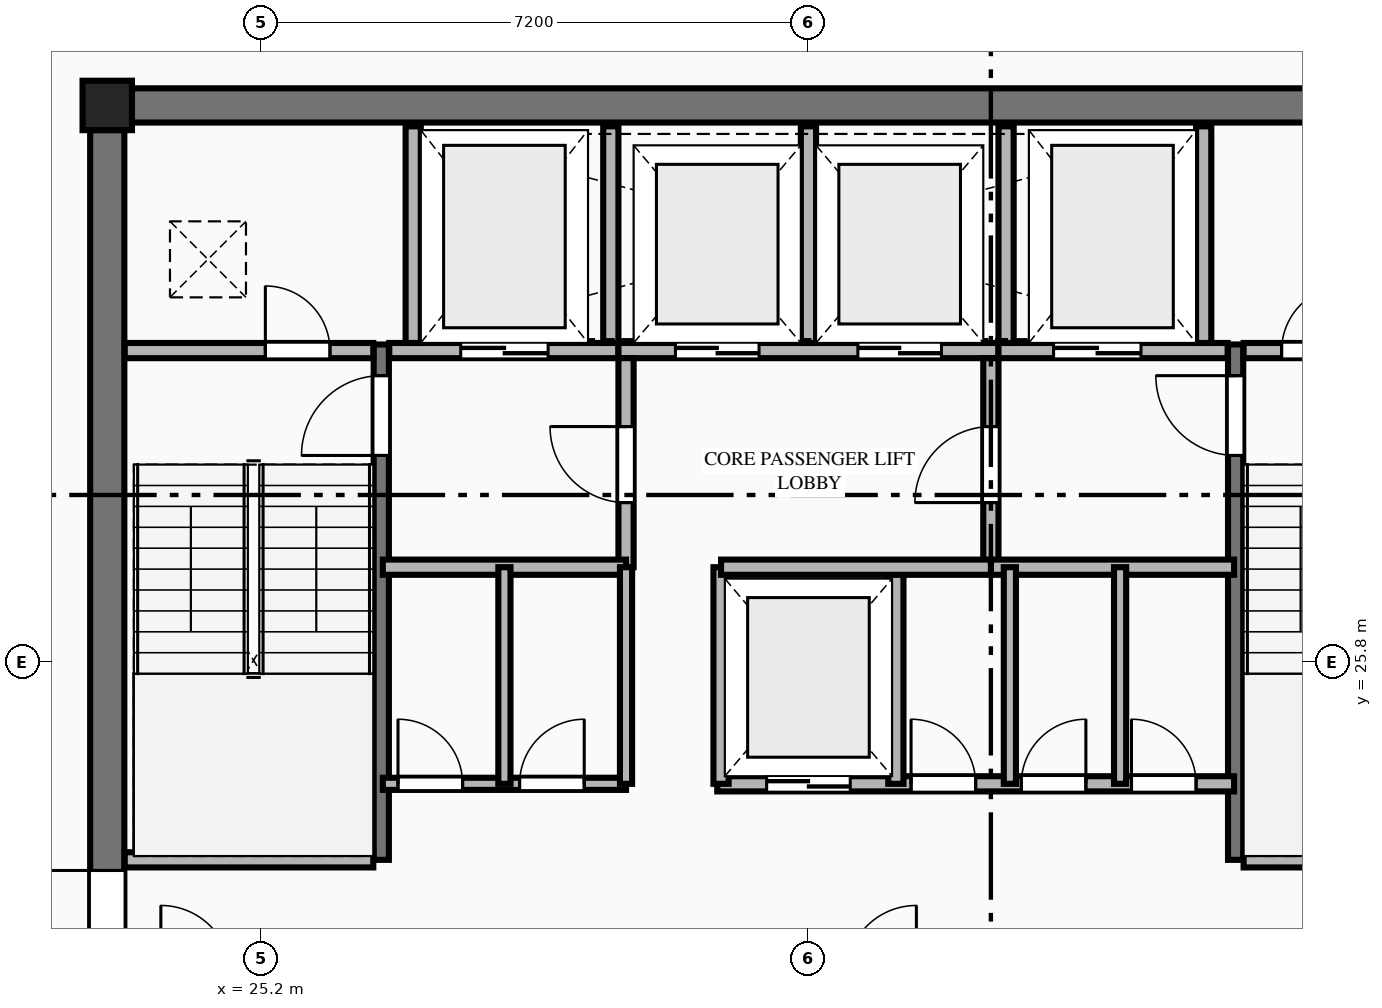
"""IFC4 building model, lengths in metres.
Left out: names, types, materials, properties, quantities, classifications, styles, units other than length and angle.
Written with IfcOpenShell. Run it as: python <this file> out.ifc"""

import sys

from ifc_helpers import new_model, si_unit, direction, frame, frame_2d, origin, origin_2d, place, context, subcontext, project, spatial, rectangle, extrude, element, fill, save


model = new_model("IFC4")
c1 = context("Model", 3, precision=1e-05, world=origin(), true_north=direction((0.0, 1.0)))
c2 = subcontext(c1, "Body", "Model", "MODEL_VIEW")
j1 = project(units=[si_unit("LENGTHUNIT", "METRE"), si_unit("PLANEANGLEUNIT", "RADIAN")], contexts=[c1])
p1 = place(None, origin())
s1 = spatial("IfcSite", under=j1, at=p1, CompositionType="ELEMENT")
p2 = place(p1, origin())
s2 = spatial("IfcBuilding", under=s1, at=p2, CompositionType="ELEMENT")
p3 = place(p2, frame((0.0, 0.0, 248.9)))
s3 = spatial("IfcBuildingStorey", under=s2, at=p3, CompositionType="ELEMENT", Elevation=248.9)
p4 = place(p3, frame((23.175, 33.125, 0.0), z_axis=(0.0, 0.0, 1.0), x_axis=(1.0, 0.0, 0.0)))
e1 = element("IfcColumn", 1, at=p4, inside=s3, PredefinedType="COLUMN", context=c2, shape_type="SweptSolid", body=[
    extrude(rectangle(XDim=0.65, YDim=0.65, at=origin_2d()), origin(), (0.0, 0.0, 1.0), 3.65),
])
p5 = place(p3, frame((23.5, 33.125, 0.0), z_axis=(0.0, 0.0, 1.0), x_axis=(1.0, 0.0, 0.0)))
e2 = element("IfcWall", 2, at=p5, inside=s3, PredefinedType="SHEAR", context=c2, shape_type="SweptSolid", body=[
    extrude(rectangle(XDim=17.8, YDim=0.45, at=frame_2d((8.9, 0.0))), origin(), (0.0, 0.0, 1.0), 3.45),
])
p6 = place(p3, frame((23.175, 19.0, 0.0), z_axis=(0.0, 0.0, 1.0), x_axis=(0.0, 1.0, 0.0)))
e3 = element("IfcWall", 3, at=p6, inside=s3, PredefinedType="SHEAR", context=c2, shape_type="SweptSolid", body=[
    extrude(rectangle(XDim=13.8, YDim=0.45, at=frame_2d((6.9, 0.0))), origin(), (0.0, 0.0, 1.0), 3.45),
])
p7 = place(p6, frame((2.84, 0.0, 0.0)))
e4 = element("IfcOpeningElement", 4, at=p7, cuts=e3, PredefinedType="OPENING", context=c2, shape_type="SweptSolid", body=[
    extrude(rectangle(XDim=1.22, YDim=2.25, at=frame_2d((0.61, 1.125))), frame((0.0, 0.235, 0.0), z_axis=(0.0, -1.0, 0.0), x_axis=(1.0, 0.0, 0.0)), (0.0, 0.0, 1.0), 0.47),
])
p8 = place(p3, frame((26.78, 23.2, 0.0), z_axis=(0.0, 0.0, 1.0), x_axis=(0.0, 1.0, 0.0)))
e5 = element("IfcWall", 5, at=p8, inside=s3, PredefinedType="SHEAR", context=c2, shape_type="SweptSolid", body=[
    extrude(rectangle(XDim=6.78, YDim=0.2, at=frame_2d((3.39, 0.0))), origin(), (0.0, 0.0, 1.0), 3.65),
])
p9 = place(p8, frame((5.32, 0.0, 0.0)))
e6 = element("IfcOpeningElement", 6, at=p9, cuts=e5, PredefinedType="OPENING", context=c2, shape_type="SweptSolid", body=[
    extrude(rectangle(XDim=1.05, YDim=2.15, at=frame_2d((0.525, 1.075))), frame((0.0, 0.11, 0.0), z_axis=(0.0, -1.0, 0.0), x_axis=(1.0, 0.0, 0.0)), (0.0, 0.0, 1.0), 0.22),
])
p10 = place(p3, frame((23.405, 23.2, 0.0), z_axis=(0.0, 0.0, 1.0), x_axis=(1.0, 0.0, 0.0)))
e7 = element("IfcWall", 7, at=p10, inside=s3, PredefinedType="PLUMBINGWALL", context=c2, shape_type="SweptSolid", body=[
    extrude(rectangle(XDim=3.27, YDim=0.2, at=frame_2d((1.635, 0.0))), origin(), (0.0, 0.0, 1.0), 3.45),
])
p11 = place(p3, frame((38.02, 23.2, 0.0), z_axis=(0.0, 0.0, 1.0), x_axis=(0.0, 1.0, 0.0)))
e8 = element("IfcWall", 8, at=p11, inside=s3, PredefinedType="SHEAR", context=c2, shape_type="SweptSolid", body=[
    extrude(rectangle(XDim=6.78, YDim=0.2, at=frame_2d((3.39, 0.0))), origin(), (0.0, 0.0, 1.0), 3.65),
])
p12 = place(p11, frame((5.32, 0.0, 0.0)))
e9 = element("IfcOpeningElement", 9, at=p12, cuts=e8, PredefinedType="OPENING", context=c2, shape_type="SweptSolid", body=[
    extrude(rectangle(XDim=1.05, YDim=2.15, at=frame_2d((0.525, 1.075))), frame((0.0, 0.11, 0.0), z_axis=(0.0, -1.0, 0.0), x_axis=(1.0, 0.0, 0.0)), (0.0, 0.0, 1.0), 0.22),
])
p13 = place(p3, frame((38.125, 23.2, 0.0), z_axis=(0.0, 0.0, 1.0), x_axis=(1.0, 0.0, 0.0)))
e10 = element("IfcWall", 10, at=p13, inside=s3, PredefinedType="PLUMBINGWALL", context=c2, shape_type="SweptSolid", body=[
    extrude(rectangle(XDim=3.27, YDim=0.2, at=frame_2d((1.635, 0.0))), origin(), (0.0, 0.0, 1.0), 3.45),
])
p14 = place(p3, frame((23.405, 29.9, 0.0), z_axis=(0.0, 0.0, 1.0), x_axis=(1.0, 0.0, 0.0)))
e11 = element("IfcWall", 11, at=p14, inside=s3, PredefinedType="PLUMBINGWALL", context=c2, shape_type="SweptSolid", body=[
    extrude(rectangle(XDim=3.27, YDim=0.2, at=frame_2d((1.635, 0.0))), origin(), (0.0, 0.0, 1.0), 3.45),
])
p15 = place(p14, frame((1.85, 0.0, 0.0)))
e12 = element("IfcOpeningElement", 12, at=p15, cuts=e11, PredefinedType="OPENING", context=c2, shape_type="SweptSolid", body=[
    extrude(rectangle(XDim=0.85, YDim=2.05, at=frame_2d((0.425, 1.025))), frame((0.0, 0.11, 0.0), z_axis=(0.0, -1.0, 0.0), x_axis=(1.0, 0.0, 0.0)), (0.0, 0.0, 1.0), 0.22),
])
p16 = place(p3, frame((26.885, 29.9, 0.0), z_axis=(0.0, 0.0, 1.0), x_axis=(1.0, 0.0, 0.0)))
e13 = element("IfcWall", 13, at=p16, inside=s3, PredefinedType="PLUMBINGWALL", context=c2, shape_type="SweptSolid", body=[
    extrude(rectangle(XDim=3.015, YDim=0.2, at=frame_2d((1.507, 0.0))), origin(), (0.0, 0.0, 1.0), 3.45),
])
p17 = place(p16, frame((0.94, 0.0, 0.0)))
e14 = element("IfcOpeningElement", 14, at=p17, cuts=e13, PredefinedType="OPENING", context=c2, shape_type="SweptSolid", body=[
    extrude(rectangle(XDim=1.15, YDim=2.2, at=frame_2d((0.575, 1.1))), frame((0.0, 0.11, 0.0), z_axis=(0.0, -1.0, 0.0), x_axis=(1.0, 0.0, 0.0)), (0.0, 0.0, 1.0), 0.22),
])
p18 = place(p3, frame((29.9, 29.9, 0.0), z_axis=(0.0, 0.0, 1.0), x_axis=(1.0, 0.0, 0.0)))
e15 = element("IfcWall", 15, at=p18, inside=s3, PredefinedType="PLUMBINGWALL", context=c2, shape_type="SweptSolid", body=[
    extrude(rectangle(XDim=5.0, YDim=0.2, at=frame_2d((2.5, 0.0))), origin(), (0.0, 0.0, 1.0), 3.45),
])
p19 = place(p18, frame((0.75, 0.0, 0.0)))
e16 = element("IfcOpeningElement", 16, at=p19, cuts=e15, PredefinedType="OPENING", context=c2, shape_type="SweptSolid", body=[
    extrude(rectangle(XDim=1.1, YDim=2.2, at=frame_2d((0.55, 1.1))), frame((0.0, 0.11, 0.0), z_axis=(0.0, -1.0, 0.0), x_axis=(1.0, 0.0, 0.0)), (0.0, 0.0, 1.0), 0.22),
])
p20 = place(p18, frame((3.15, 0.0, 0.0)))
e17 = element("IfcOpeningElement", 17, at=p20, cuts=e15, PredefinedType="OPENING", context=c2, shape_type="SweptSolid", body=[
    extrude(rectangle(XDim=1.1, YDim=2.2, at=frame_2d((0.55, 1.1))), frame((0.0, 0.11, 0.0), z_axis=(0.0, -1.0, 0.0), x_axis=(1.0, 0.0, 0.0)), (0.0, 0.0, 1.0), 0.22),
])
p21 = place(p3, frame((34.9, 29.9, 0.0), z_axis=(0.0, 0.0, 1.0), x_axis=(1.0, 0.0, 0.0)))
e18 = element("IfcWall", 18, at=p21, inside=s3, PredefinedType="PLUMBINGWALL", context=c2, shape_type="SweptSolid", body=[
    extrude(rectangle(XDim=3.015, YDim=0.2, at=frame_2d((1.508, 0.0))), origin(), (0.0, 0.0, 1.0), 3.45),
])
p22 = place(p21, frame((0.725, 0.0, 0.0)))
e19 = element("IfcOpeningElement", 19, at=p22, cuts=e18, PredefinedType="OPENING", context=c2, shape_type="SweptSolid", body=[
    extrude(rectangle(XDim=1.15, YDim=2.2, at=frame_2d((0.575, 1.1))), frame((0.0, 0.11, 0.0), z_axis=(0.0, -1.0, 0.0), x_axis=(1.0, 0.0, 0.0)), (0.0, 0.0, 1.0), 0.22),
])
p23 = place(p3, frame((38.125, 29.9, 0.0), z_axis=(0.0, 0.0, 1.0), x_axis=(1.0, 0.0, 0.0)))
e20 = element("IfcWall", 20, at=p23, inside=s3, PredefinedType="PLUMBINGWALL", context=c2, shape_type="SweptSolid", body=[
    extrude(rectangle(XDim=3.27, YDim=0.2, at=frame_2d((1.635, 0.0))), origin(), (0.0, 0.0, 1.0), 3.45),
])
p24 = place(p23, frame((0.5, 0.0, 0.0)))
e21 = element("IfcOpeningElement", 21, at=p24, cuts=e20, PredefinedType="OPENING", context=c2, shape_type="SweptSolid", body=[
    extrude(rectangle(XDim=0.85, YDim=2.05, at=frame_2d((0.425, 1.025))), frame((0.0, 0.11, 0.0), z_axis=(0.0, -1.0, 0.0), x_axis=(1.0, 0.0, 0.0)), (0.0, 0.0, 1.0), 0.22),
])
for number, where, z_axis, x_axis in (
    (22, (27.2, 30.0, 0.0), (0.0, 0.0, 1.0), (0.0, 1.0, 0.0)),
    (23, (29.8, 30.0, 0.0), (0.0, 0.0, 1.0), (0.0, 1.0, 0.0)),
    (24, (32.4, 30.0, 0.0), (0.0, 0.0, 1.0), (0.0, 1.0, 0.0)),
    (25, (35.0, 30.0, 0.0), (0.0, 0.0, 1.0), (0.0, 1.0, 0.0)),
    (26, (37.6, 30.0, 0.0), (0.0, 0.0, 1.0), (0.0, 1.0, 0.0)),
):
    element("IfcWall", number, at=place(p3, frame(where, z_axis=z_axis, x_axis=x_axis)), inside=s3, PredefinedType="PLUMBINGWALL", context=c2, shape_type="SweptSolid", body=[
        extrude(rectangle(XDim=2.85, YDim=0.2, at=frame_2d((1.425, 0.0))), origin(), (0.0, 0.0, 1.0), 3.45),
    ])
p25 = place(p3, frame((30.0, 27.05, 0.0), z_axis=(0.0, 0.0, 1.0), x_axis=(0.0, 1.0, 0.0)))
e27 = element("IfcWall", 27, at=p25, inside=s3, PredefinedType="PLUMBINGWALL", context=c2, shape_type="SweptSolid", body=[
    extrude(rectangle(XDim=2.75, YDim=0.2, at=frame_2d((1.375, 0.0))), origin(), (0.0, 0.0, 1.0), 3.45),
])
p26 = place(p25, frame((0.85, 0.0, 0.0)))
e28 = element("IfcOpeningElement", 28, at=p26, cuts=e27, PredefinedType="OPENING", context=c2, shape_type="SweptSolid", body=[
    extrude(rectangle(XDim=1.0, YDim=2.15, at=frame_2d((0.5, 1.075))), frame((0.0, 0.11, 0.0), z_axis=(0.0, -1.0, 0.0), x_axis=(1.0, 0.0, 0.0)), (0.0, 0.0, 1.0), 0.22),
])
p27 = place(p3, frame((26.8, 27.05, 0.0), z_axis=(0.0, 0.0, 1.0), x_axis=(1.0, 0.0, 0.0)))
e29 = element("IfcWall", 29, at=p27, inside=s3, PredefinedType="PLUMBINGWALL", context=c2, shape_type="SweptSolid", body=[
    extrude(rectangle(XDim=3.2, YDim=0.2, at=frame_2d((1.6, 0.0))), origin(), (0.0, 0.0, 1.0), 3.45),
])
p28 = place(p3, frame((34.8, 27.05, 0.0), z_axis=(0.0, 0.0, 1.0), x_axis=(0.0, 1.0, 0.0)))
e30 = element("IfcWall", 30, at=p28, inside=s3, PredefinedType="PLUMBINGWALL", context=c2, shape_type="SweptSolid", body=[
    extrude(rectangle(XDim=2.75, YDim=0.2, at=frame_2d((1.375, 0.0))), origin(), (0.0, 0.0, 1.0), 3.45),
])
p29 = place(p28, frame((0.85, 0.0, 0.0)))
e31 = element("IfcOpeningElement", 31, at=p29, cuts=e30, PredefinedType="OPENING", context=c2, shape_type="SweptSolid", body=[
    extrude(rectangle(XDim=1.0, YDim=2.15, at=frame_2d((0.5, 1.075))), frame((0.0, 0.11, 0.0), z_axis=(0.0, -1.0, 0.0), x_axis=(1.0, 0.0, 0.0)), (0.0, 0.0, 1.0), 0.22),
])
p30 = place(p3, frame((34.8, 27.05, 0.0), z_axis=(0.0, 0.0, 1.0), x_axis=(1.0, 0.0, 0.0)))
e32 = element("IfcWall", 32, at=p30, inside=s3, PredefinedType="PLUMBINGWALL", context=c2, shape_type="SweptSolid", body=[
    extrude(rectangle(XDim=3.2, YDim=0.2, at=frame_2d((1.6, 0.0))), origin(), (0.0, 0.0, 1.0), 3.45),
])
p31 = place(p3, frame((26.8, 24.2, 0.0), z_axis=(0.0, 0.0, 1.0), x_axis=(1.0, 0.0, 0.0)))
e33 = element("IfcWall", 33, at=p31, inside=s3, PredefinedType="PARTITIONING", context=c2, shape_type="SweptSolid", body=[
    extrude(rectangle(XDim=3.2, YDim=0.16, at=frame_2d((1.6, 0.0))), origin(), (0.0, 0.0, 1.0), 3.45),
])
p32 = place(p31, frame((0.2, 0.0, 0.0)))
e34 = element("IfcOpeningElement", 34, at=p32, cuts=e33, PredefinedType="OPENING", context=c2, shape_type="SweptSolid", body=[
    extrude(rectangle(XDim=0.85, YDim=2.05, at=frame_2d((0.425, 1.025))), frame((0.0, 0.09, 0.0), z_axis=(0.0, -1.0, 0.0), x_axis=(1.0, 0.0, 0.0)), (0.0, 0.0, 1.0), 0.18),
])
p33 = place(p31, frame((1.8, 0.0, 0.0)))
e35 = element("IfcOpeningElement", 35, at=p33, cuts=e33, PredefinedType="OPENING", context=c2, shape_type="SweptSolid", body=[
    extrude(rectangle(XDim=0.85, YDim=2.05, at=frame_2d((0.425, 1.025))), frame((0.0, 0.09, 0.0), z_axis=(0.0, -1.0, 0.0), x_axis=(1.0, 0.0, 0.0)), (0.0, 0.0, 1.0), 0.18),
])
p34 = place(p3, frame((30.0, 24.2, 0.0), z_axis=(0.0, 0.0, 1.0), x_axis=(0.0, 1.0, 0.0)))
e36 = element("IfcWall", 36, at=p34, inside=s3, PredefinedType="PARTITIONING", context=c2, shape_type="SweptSolid", body=[
    extrude(rectangle(XDim=2.85, YDim=0.16, at=frame_2d((1.425, 0.0))), origin(), (0.0, 0.0, 1.0), 3.45),
])
p35 = place(p3, frame((31.2, 24.2, 0.0), z_axis=(0.0, 0.0, 1.0), x_axis=(1.0, 0.0, 0.0)))
e37 = element("IfcWall", 37, at=p35, inside=s3, PredefinedType="PLUMBINGWALL", context=c2, shape_type="SweptSolid", body=[
    extrude(rectangle(XDim=6.8, YDim=0.2, at=frame_2d((3.4, 0.0))), origin(), (0.0, 0.0, 1.0), 3.45),
])
p36 = place(p35, frame((0.65, 0.0, 0.0)))
e38 = element("IfcOpeningElement", 38, at=p36, cuts=e37, PredefinedType="OPENING", context=c2, shape_type="SweptSolid", body=[
    extrude(rectangle(XDim=1.1, YDim=2.2, at=frame_2d((0.55, 1.1))), frame((0.0, 0.11, 0.0), z_axis=(0.0, -1.0, 0.0), x_axis=(1.0, 0.0, 0.0)), (0.0, 0.0, 1.0), 0.22),
])
p37 = place(p35, frame((2.55, 0.0, 0.0)))
e39 = element("IfcOpeningElement", 39, at=p37, cuts=e37, PredefinedType="OPENING", context=c2, shape_type="SweptSolid", body=[
    extrude(rectangle(XDim=0.85, YDim=2.05, at=frame_2d((0.425, 1.025))), frame((0.0, 0.11, 0.0), z_axis=(0.0, -1.0, 0.0), x_axis=(1.0, 0.0, 0.0)), (0.0, 0.0, 1.0), 0.22),
])
p38 = place(p35, frame((4.0, 0.0, 0.0)))
e40 = element("IfcOpeningElement", 40, at=p38, cuts=e37, PredefinedType="OPENING", context=c2, shape_type="SweptSolid", body=[
    extrude(rectangle(XDim=0.85, YDim=2.05, at=frame_2d((0.425, 1.025))), frame((0.0, 0.11, 0.0), z_axis=(0.0, -1.0, 0.0), x_axis=(1.0, 0.0, 0.0)), (0.0, 0.0, 1.0), 0.22),
])
p39 = place(p35, frame((5.45, 0.0, 0.0)))
e41 = element("IfcOpeningElement", 41, at=p39, cuts=e37, PredefinedType="OPENING", context=c2, shape_type="SweptSolid", body=[
    extrude(rectangle(XDim=0.85, YDim=2.05, at=frame_2d((0.425, 1.025))), frame((0.0, 0.11, 0.0), z_axis=(0.0, -1.0, 0.0), x_axis=(1.0, 0.0, 0.0)), (0.0, 0.0, 1.0), 0.22),
])
for number, where, z_axis, x_axis in (
    (42, (31.25, 24.2, 0.0), (0.0, 0.0, 1.0), (0.0, 1.0, 0.0)),
    (43, (33.55, 24.2, 0.0), (0.0, 0.0, 1.0), (0.0, 1.0, 0.0)),
):
    element("IfcWall", number, at=place(p3, frame(where, z_axis=z_axis, x_axis=x_axis)), inside=s3, PredefinedType="PLUMBINGWALL", context=c2, shape_type="SweptSolid", body=[
        extrude(rectangle(XDim=2.85, YDim=0.2, at=frame_2d((1.425, 0.0))), origin(), (0.0, 0.0, 1.0), 3.45),
    ])
p40 = place(p3, frame((31.25, 27.05, 0.0), z_axis=(0.0, 0.0, 1.0), x_axis=(1.0, 0.0, 0.0)))
e44 = element("IfcWall", 44, at=p40, inside=s3, PredefinedType="PLUMBINGWALL", context=c2, shape_type="SweptSolid", body=[
    extrude(rectangle(XDim=3.55, YDim=0.2, at=frame_2d((1.775, 0.0))), origin(), (0.0, 0.0, 1.0), 3.45),
])
for number, where, z_axis, x_axis in (
    (45, (28.4, 24.2, 0.0), (0.0, 0.0, 1.0), (0.0, 1.0, 0.0)),
    (46, (35.05, 24.2, 0.0), (0.0, 0.0, 1.0), (0.0, 1.0, 0.0)),
    (47, (36.5, 24.2, 0.0), (0.0, 0.0, 1.0), (0.0, 1.0, 0.0)),
):
    element("IfcWall", number, at=place(p3, frame(where, z_axis=z_axis, x_axis=x_axis)), inside=s3, PredefinedType="PARTITIONING", context=c2, shape_type="SweptSolid", body=[
        extrude(rectangle(XDim=2.85, YDim=0.16, at=frame_2d((1.425, 0.0))), origin(), (0.0, 0.0, 1.0), 3.45),
    ])
p41 = place(p7, origin())
e48 = element("IfcDoor", 48, at=p41, inside=s3, OperationType="SINGLE_SWING_RIGHT", PredefinedType="DOOR", context=c2, shape_type="SweptSolid", body=[
    extrude(rectangle(XDim=1.22, YDim=2.25, at=frame_2d((0.61, 1.125))), frame((0.0, 0.025, 0.0), z_axis=(0.0, -1.0, 0.0), x_axis=(1.0, 0.0, 0.0)), (0.0, 0.0, 1.0), 0.05),
])
fill(e4, e48)
p42 = place(p9, origin())
e49 = element("IfcDoor", 49, at=p42, inside=s3, OperationType="SINGLE_SWING_LEFT", PredefinedType="DOOR", context=c2, shape_type="SweptSolid", body=[
    extrude(rectangle(XDim=1.05, YDim=2.15, at=frame_2d((0.525, 1.075))), frame((0.0, 0.025, 0.0), z_axis=(0.0, -1.0, 0.0), x_axis=(1.0, 0.0, 0.0)), (0.0, 0.0, 1.0), 0.05),
])
fill(e6, e49)
p43 = place(p12, origin())
e50 = element("IfcDoor", 50, at=p43, inside=s3, OperationType="SINGLE_SWING_RIGHT", PredefinedType="DOOR", context=c2, shape_type="SweptSolid", body=[
    extrude(rectangle(XDim=1.05, YDim=2.15, at=frame_2d((0.525, 1.075))), frame((0.0, 0.025, 0.0), z_axis=(0.0, -1.0, 0.0), x_axis=(1.0, 0.0, 0.0)), (0.0, 0.0, 1.0), 0.05),
])
fill(e9, e50)
p44 = place(p15, origin())
e51 = element("IfcDoor", 51, at=p44, inside=s3, OperationType="SINGLE_SWING_LEFT", PredefinedType="DOOR", context=c2, shape_type="SweptSolid", body=[
    extrude(rectangle(XDim=0.85, YDim=2.05, at=frame_2d((0.425, 1.025))), frame((0.0, 0.025, 0.0), z_axis=(0.0, -1.0, 0.0), x_axis=(1.0, 0.0, 0.0)), (0.0, 0.0, 1.0), 0.05),
])
fill(e12, e51)
p45 = place(p24, origin())
e52 = element("IfcDoor", 52, at=p45, inside=s3, OperationType="SINGLE_SWING_RIGHT", PredefinedType="DOOR", context=c2, shape_type="SweptSolid", body=[
    extrude(rectangle(XDim=0.85, YDim=2.05, at=frame_2d((0.425, 1.025))), frame((0.0, 0.025, 0.0), z_axis=(0.0, -1.0, 0.0), x_axis=(1.0, 0.0, 0.0)), (0.0, 0.0, 1.0), 0.05),
])
fill(e21, e52)
p46 = place(p17, origin())
e53 = element("IfcDoor", 53, at=p46, inside=s3, OperationType="DOUBLE_DOOR_SLIDING", PredefinedType="DOOR", context=c2, shape_type="SweptSolid", body=[
    extrude(rectangle(XDim=1.15, YDim=2.2, at=frame_2d((0.575, 1.1))), frame((0.0, 0.025, 0.0), z_axis=(0.0, -1.0, 0.0), x_axis=(1.0, 0.0, 0.0)), (0.0, 0.0, 1.0), 0.05),
])
fill(e14, e53)
p47 = place(p22, origin())
e54 = element("IfcDoor", 54, at=p47, inside=s3, OperationType="DOUBLE_DOOR_SLIDING", PredefinedType="DOOR", context=c2, shape_type="SweptSolid", body=[
    extrude(rectangle(XDim=1.15, YDim=2.2, at=frame_2d((0.575, 1.1))), frame((0.0, 0.025, 0.0), z_axis=(0.0, -1.0, 0.0), x_axis=(1.0, 0.0, 0.0)), (0.0, 0.0, 1.0), 0.05),
])
fill(e19, e54)
p48 = place(p19, origin())
e55 = element("IfcDoor", 55, at=p48, inside=s3, OperationType="DOUBLE_DOOR_SLIDING", PredefinedType="DOOR", context=c2, shape_type="SweptSolid", body=[
    extrude(rectangle(XDim=1.1, YDim=2.2, at=frame_2d((0.55, 1.1))), frame((0.0, 0.025, 0.0), z_axis=(0.0, -1.0, 0.0), x_axis=(1.0, 0.0, 0.0)), (0.0, 0.0, 1.0), 0.05),
])
fill(e16, e55)
p49 = place(p20, origin())
e56 = element("IfcDoor", 56, at=p49, inside=s3, OperationType="DOUBLE_DOOR_SLIDING", PredefinedType="DOOR", context=c2, shape_type="SweptSolid", body=[
    extrude(rectangle(XDim=1.1, YDim=2.2, at=frame_2d((0.55, 1.1))), frame((0.0, 0.025, 0.0), z_axis=(0.0, -1.0, 0.0), x_axis=(1.0, 0.0, 0.0)), (0.0, 0.0, 1.0), 0.05),
])
fill(e17, e56)
p50 = place(p26, origin())
e57 = element("IfcDoor", 57, at=p50, inside=s3, OperationType="SINGLE_SWING_RIGHT", PredefinedType="DOOR", context=c2, shape_type="SweptSolid", body=[
    extrude(rectangle(XDim=1.0, YDim=2.15, at=frame_2d((0.5, 1.075))), frame((0.0, 0.025, 0.0), z_axis=(0.0, -1.0, 0.0), x_axis=(1.0, 0.0, 0.0)), (0.0, 0.0, 1.0), 0.05),
])
fill(e28, e57)
p51 = place(p29, origin())
e58 = element("IfcDoor", 58, at=p51, inside=s3, OperationType="SINGLE_SWING_LEFT", PredefinedType="DOOR", context=c2, shape_type="SweptSolid", body=[
    extrude(rectangle(XDim=1.0, YDim=2.15, at=frame_2d((0.5, 1.075))), frame((0.0, 0.025, 0.0), z_axis=(0.0, -1.0, 0.0), x_axis=(1.0, 0.0, 0.0)), (0.0, 0.0, 1.0), 0.05),
])
fill(e31, e58)
p52 = place(p36, origin())
e59 = element("IfcDoor", 59, at=p52, inside=s3, OperationType="DOUBLE_DOOR_SLIDING", PredefinedType="DOOR", context=c2, shape_type="SweptSolid", body=[
    extrude(rectangle(XDim=1.1, YDim=2.2, at=frame_2d((0.55, 1.1))), frame((0.0, 0.025, 0.0), z_axis=(0.0, -1.0, 0.0), x_axis=(1.0, 0.0, 0.0)), (0.0, 0.0, 1.0), 0.05),
])
fill(e38, e59)
p53 = place(p32, origin())
e60 = element("IfcDoor", 60, at=p53, inside=s3, OperationType="SINGLE_SWING_LEFT", PredefinedType="DOOR", context=c2, shape_type="SweptSolid", body=[
    extrude(rectangle(XDim=0.85, YDim=2.05, at=frame_2d((0.425, 1.025))), frame((0.0, 0.025, 0.0), z_axis=(0.0, -1.0, 0.0), x_axis=(1.0, 0.0, 0.0)), (0.0, 0.0, 1.0), 0.05),
])
fill(e34, e60)
p54 = place(p33, origin())
e61 = element("IfcDoor", 61, at=p54, inside=s3, OperationType="SINGLE_SWING_RIGHT", PredefinedType="DOOR", context=c2, shape_type="SweptSolid", body=[
    extrude(rectangle(XDim=0.85, YDim=2.05, at=frame_2d((0.425, 1.025))), frame((0.0, 0.025, 0.0), z_axis=(0.0, -1.0, 0.0), x_axis=(1.0, 0.0, 0.0)), (0.0, 0.0, 1.0), 0.05),
])
fill(e35, e61)
p55 = place(p37, origin())
e62 = element("IfcDoor", 62, at=p55, inside=s3, OperationType="SINGLE_SWING_LEFT", PredefinedType="DOOR", context=c2, shape_type="SweptSolid", body=[
    extrude(rectangle(XDim=0.85, YDim=2.05, at=frame_2d((0.425, 1.025))), frame((0.0, 0.025, 0.0), z_axis=(0.0, -1.0, 0.0), x_axis=(1.0, 0.0, 0.0)), (0.0, 0.0, 1.0), 0.05),
])
fill(e39, e62)
p56 = place(p38, origin())
e63 = element("IfcDoor", 63, at=p56, inside=s3, OperationType="SINGLE_SWING_RIGHT", PredefinedType="DOOR", context=c2, shape_type="SweptSolid", body=[
    extrude(rectangle(XDim=0.85, YDim=2.05, at=frame_2d((0.425, 1.025))), frame((0.0, 0.025, 0.0), z_axis=(0.0, -1.0, 0.0), x_axis=(1.0, 0.0, 0.0)), (0.0, 0.0, 1.0), 0.05),
])
fill(e40, e63)
p57 = place(p39, origin())
e64 = element("IfcDoor", 64, at=p57, inside=s3, OperationType="SINGLE_SWING_LEFT", PredefinedType="DOOR", context=c2, shape_type="SweptSolid", body=[
    extrude(rectangle(XDim=0.85, YDim=2.05, at=frame_2d((0.425, 1.025))), frame((0.0, 0.025, 0.0), z_axis=(0.0, -1.0, 0.0), x_axis=(1.0, 0.0, 0.0)), (0.0, 0.0, 1.0), 0.05),
])
fill(e41, e64)
save(model, sys.argv[1])
